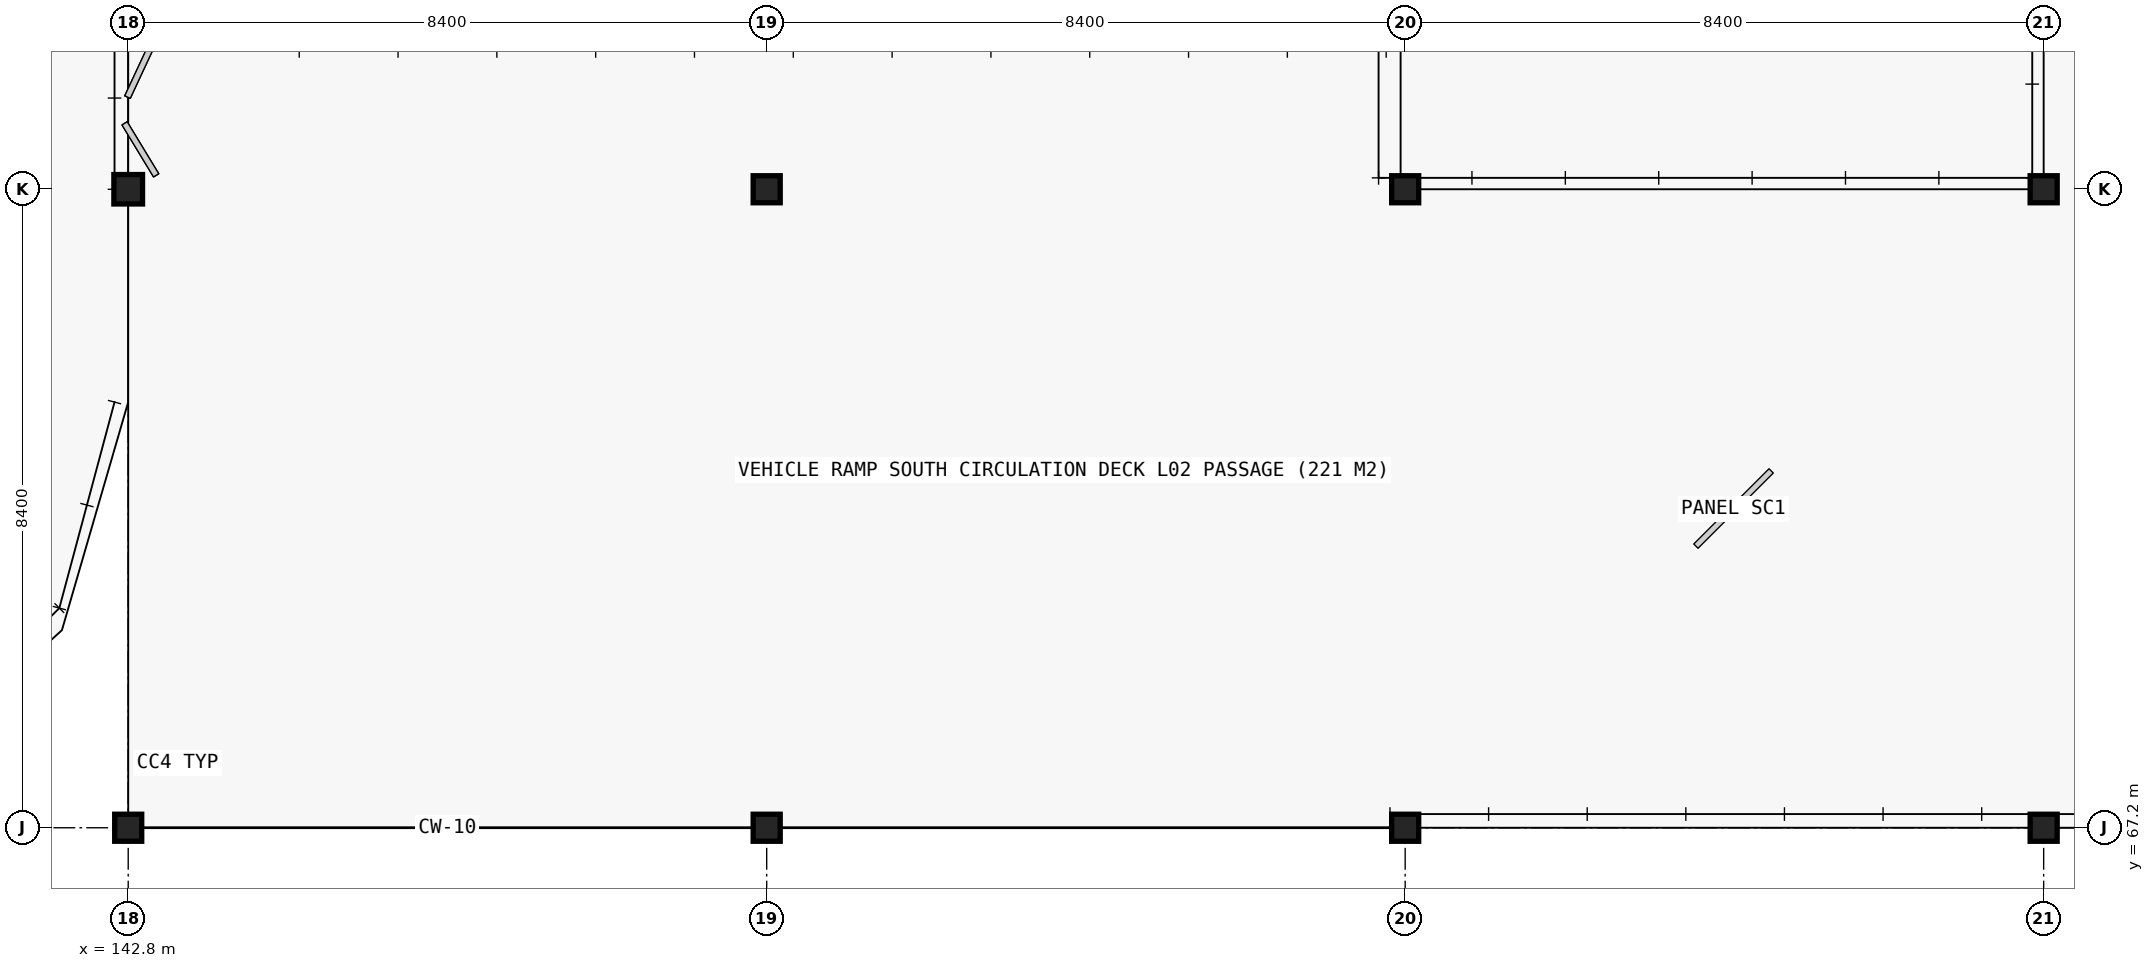
"""IFC4 building model, lengths in metres.
Left out: names, types, materials, properties, quantities, classifications, styles, units other than length and angle.
Written with IfcOpenShell. Run it as: python <this file> out.ifc"""

import sys

from ifc_helpers import new_model, si_unit, direction, frame, origin, origin_2d, place, context, subcontext, project, spatial, hollow_circle, i_section, extrude, element, save


model = new_model("IFC4")
c1 = context("Model", 3, precision=1e-05, world=origin(), true_north=direction((0.0, 1.0)))
c2 = subcontext(c1, "Body", "Model", "MODEL_VIEW")
j1 = project(units=[si_unit("LENGTHUNIT", "METRE"), si_unit("PLANEANGLEUNIT", "RADIAN")], contexts=[c1])
p1 = place(None, origin())
s1 = spatial("IfcSite", under=j1, at=p1, CompositionType="ELEMENT")
p2 = place(p1, origin())
s2 = spatial("IfcBuilding", under=s1, at=p2, CompositionType="ELEMENT")
p3 = place(p2, frame((0.0, 0.0, 9.0)))
s3 = spatial("IfcBuildingStorey", under=s2, at=p3, CompositionType="ELEMENT", Elevation=9.0)
p4 = place(p3, frame((142.8, 67.2, 0.0), z_axis=(0.0, 0.0, 1.0), x_axis=(1.0, 0.0, 0.0)))
e1 = element("IfcColumn", 1, at=p4, inside=s3, PredefinedType="COLUMN", context=c2, shape_type="SweptSolid", body=[
    extrude(hollow_circle(Radius=0.178, WallThickness=0.01, at=origin_2d()), origin(), (0.0, 0.0, 1.0), 4.2),
])
p5 = place(p3, frame((142.8, 75.6, 0.0), z_axis=(0.0, 0.0, 1.0), x_axis=(1.0, 0.0, 0.0)))
e2 = element("IfcColumn", 2, at=p5, inside=s3, PredefinedType="COLUMN", context=c2, shape_type="SweptSolid", body=[
    extrude(i_section(OverallWidth=0.377, OverallDepth=0.387, WebThickness=0.022, FlangeThickness=0.036, FilletRadius=0.015, at=origin_2d()), origin(), (0.0, 0.0, 1.0), 4.2),
])
for number, where, z_axis, x_axis in (
    (3, (151.2, 67.2, 0.0), (0.0, 0.0, 1.0), (1.0, 0.0, 0.0)),
    (4, (151.2, 75.6, 0.0), (0.0, 0.0, 1.0), (1.0, 0.0, 0.0)),
    (5, (159.6, 67.2, 0.0), (0.0, 0.0, 1.0), (1.0, 0.0, 0.0)),
    (6, (159.6, 75.6, 0.0), (0.0, 0.0, 1.0), (1.0, 0.0, 0.0)),
    (7, (168.0, 67.2, 0.0), (0.0, 0.0, 1.0), (1.0, 0.0, 0.0)),
    (8, (168.0, 75.6, 0.0), (0.0, 0.0, 1.0), (1.0, 0.0, 0.0)),
):
    element("IfcColumn", number, at=place(p3, frame(where, z_axis=z_axis, x_axis=x_axis)), inside=s3, PredefinedType="COLUMN", context=c2, shape_type="SweptSolid", body=[
        extrude(hollow_circle(Radius=0.178, WallThickness=0.01, at=origin_2d()), origin(), (0.0, 0.0, 1.0), 4.2),
    ])
save(model, sys.argv[1])
